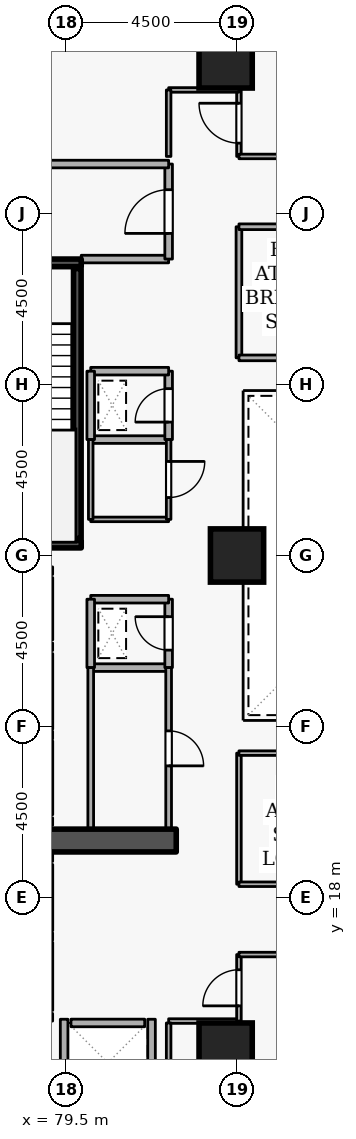
"""IFC4 building model, lengths in metres.
Left out: names, types, materials, properties, quantities, classifications, styles, units other than length and angle.
Written with IfcOpenShell. Run it as: python <this file> out.ifc"""

import sys

from ifc_helpers import new_model, si_unit, direction, frame, frame_2d, origin, origin_2d, place, context, subcontext, project, spatial, rectangle, extrude, element, fill, save


model = new_model("IFC4")
c1 = context("Model", 3, precision=1e-05, world=origin(), true_north=direction((0.0, 1.0)))
c2 = subcontext(c1, "Body", "Model", "MODEL_VIEW")
j1 = project(units=[si_unit("LENGTHUNIT", "METRE"), si_unit("PLANEANGLEUNIT", "RADIAN")], contexts=[c1])
p1 = place(None, origin())
s1 = spatial("IfcSite", under=j1, at=p1, CompositionType="ELEMENT")
p2 = place(p1, origin())
s2 = spatial("IfcBuilding", under=s1, at=p2, CompositionType="ELEMENT")
p3 = place(p2, frame((0.0, 0.0, 60.9)))
s3 = spatial("IfcBuildingStorey", under=s2, at=p3, CompositionType="ELEMENT", Elevation=60.9)
p4 = place(p3, frame((76.7, 19.5, 0.0), z_axis=(0.0, 0.0, 1.0), x_axis=(1.0, 0.0, 0.0)))
e1 = element("IfcWall", 1, at=p4, inside=s3, PredefinedType="SHEAR", context=c2, shape_type="SweptSolid", body=[
    extrude(rectangle(XDim=5.7, YDim=0.6, at=frame_2d((2.85, 0.0))), origin(), (0.0, 0.0, 1.0), 3.6),
])
for number, where, z_axis, x_axis in (
    (2, (83.7, 14.0, 0.0), (0.0, 0.0, 1.0), (1.0, 0.0, 0.0)),
    (3, (83.7, 40.0, 0.0), (0.0, 0.0, 1.0), (1.0, 0.0, 0.0)),
    (4, (84.0, 27.0, 0.0), (0.0, 0.0, 1.0), (1.0, 0.0, 0.0)),
):
    element("IfcColumn", number, at=place(p3, frame(where, z_axis=z_axis, x_axis=x_axis)), inside=s3, PredefinedType="COLUMN", context=c2, shape_type="SweptSolid", body=[
        extrude(rectangle(XDim=1.4, YDim=1.4, at=origin_2d()), origin(), (0.0, 0.0, 1.0), 3.6),
    ])
p5 = place(p3, frame((79.05, 24.78, 0.0), z_axis=(0.0, 0.0, 1.0), x_axis=(0.0, 1.0, 0.0)))
e5 = element("IfcWall", 5, at=p5, inside=s3, PredefinedType="STANDARD", context=c2, shape_type="SweptSolid", body=[
    extrude(rectangle(XDim=1.64, YDim=0.2, at=frame_2d((0.82, 0.0))), origin(), (0.0, 0.0, 1.0), 3.34),
])
p6 = place(p5, frame((0.31, 0.0, 0.0)))
e6 = element("IfcOpeningElement", 6, at=p6, cuts=e5, PredefinedType="OPENING", context=c2, shape_type="SweptSolid", body=[
    extrude(rectangle(XDim=1.02, YDim=2.06, at=frame_2d((0.51, 1.03))), frame((0.0, 0.11, 0.0), z_axis=(0.0, -1.0, 0.0), x_axis=(1.0, 0.0, 0.0)), (0.0, 0.0, 1.0), 0.22),
])
p7 = place(p3, frame((79.05, 22.43, 0.0), z_axis=(0.0, 0.0, 1.0), x_axis=(0.0, 1.0, 0.0)))
e7 = element("IfcWall", 7, at=p7, inside=s3, PredefinedType="STANDARD", context=c2, shape_type="SweptSolid", body=[
    extrude(rectangle(XDim=1.99, YDim=0.2, at=frame_2d((0.995, 0.0))), origin(), (0.0, 0.0, 1.0), 3.34),
])
p8 = place(p3, frame((79.05, 20.18, 0.0), z_axis=(0.0, 0.0, 1.0), x_axis=(0.0, 1.0, 0.0)))
e8 = element("IfcWall", 8, at=p8, inside=s3, PredefinedType="STANDARD", context=c2, shape_type="SweptSolid", body=[
    extrude(rectangle(XDim=1.94, YDim=0.2, at=frame_2d((0.97, 0.0))), origin(), (0.0, 0.0, 1.0), 3.34),
])
p9 = place(p3, frame((79.05, 17.13, 0.0), z_axis=(0.0, 0.0, 1.0), x_axis=(0.0, 1.0, 0.0)))
e9 = element("IfcWall", 9, at=p9, inside=s3, PredefinedType="STANDARD", context=c2, shape_type="SweptSolid", body=[
    extrude(rectangle(XDim=1.74, YDim=0.2, at=frame_2d((0.87, 0.0))), origin(), (0.0, 0.0, 1.0), 3.34),
])
p10 = place(p3, frame((79.05, 15.03, 0.0), z_axis=(0.0, 0.0, 1.0), x_axis=(0.0, 1.0, 0.0)))
e10 = element("IfcWall", 10, at=p10, inside=s3, PredefinedType="STANDARD", context=c2, shape_type="SweptSolid", body=[
    extrude(rectangle(XDim=1.79, YDim=0.2, at=frame_2d((0.895, 0.0))), origin(), (0.0, 0.0, 1.0), 3.34),
])
p11 = place(p3, frame((79.63, 14.7, 0.0), z_axis=(0.0, 0.0, 1.0), x_axis=(1.0, 0.0, 0.0)))
e11 = element("IfcWall", 11, at=p11, inside=s3, PredefinedType="STANDARD", context=c2, shape_type="SweptSolid", body=[
    extrude(rectangle(XDim=1.94, YDim=0.2, at=frame_2d((0.97, 0.0))), origin(), (0.0, 0.0, 1.0), 3.34),
])
for number, where, z_axis, x_axis in (
    (12, (81.75, 12.612, 0.0), (0.0, 0.0, 1.0), (0.0, 1.0, 0.0)),
    (13, (79.45, 12.612, 0.0), (0.0, 0.0, 1.0), (0.0, 1.0, 0.0)),
):
    element("IfcWall", number, at=place(p3, frame(where, z_axis=z_axis, x_axis=x_axis)), inside=s3, PredefinedType="STANDARD", context=c2, shape_type="SweptSolid", body=[
        extrude(rectangle(XDim=2.186, YDim=0.2, at=frame_2d((1.093, 0.0))), origin(), (0.0, 0.0, 1.0), 3.34),
    ])
p12 = place(p3, frame((76.55, 34.7, 0.0), z_axis=(0.0, 0.0, 1.0), x_axis=(1.0, 0.0, 0.0)))
e14 = element("IfcWall", 14, at=p12, inside=s3, PredefinedType="SHEAR", context=c2, shape_type="SweptSolid", body=[
    extrude(rectangle(XDim=3.35, YDim=0.2, at=frame_2d((1.675, 0.0))), origin(), (0.0, 0.0, 1.0), 3.6),
])
p13 = place(p12, frame((1.125, 0.0, 0.0)))
e15 = element("IfcOpeningElement", 15, at=p13, cuts=e14, PredefinedType="OPENING", context=c2, shape_type="SweptSolid", body=[
    extrude(rectangle(XDim=1.1, YDim=2.1, at=frame_2d((0.55, 1.05))), frame((0.0, 0.11, 0.0), z_axis=(0.0, -1.0, 0.0), x_axis=(1.0, 0.0, 0.0)), (0.0, 0.0, 1.0), 0.22),
])
p14 = place(p3, frame((79.9, 27.3, 0.0), z_axis=(0.0, 0.0, 1.0), x_axis=(-1.0, 0.0, 0.0)))
e16 = element("IfcWall", 16, at=p14, inside=s3, PredefinedType="SHEAR", context=c2, shape_type="SweptSolid", body=[
    extrude(rectangle(XDim=3.35, YDim=0.2, at=frame_2d((1.675, 0.0))), origin(), (0.0, 0.0, 1.0), 3.6),
])
p15 = place(p3, frame((79.797, 27.45, 0.0), z_axis=(0.0, 0.0, 1.0), x_axis=(0.0, 1.0, 0.0)))
e17 = element("IfcWall", 17, at=p15, inside=s3, PredefinedType="SHEAR", context=c2, shape_type="SweptSolid", body=[
    extrude(rectangle(XDim=7.1, YDim=0.2, at=frame_2d((3.55, 0.0))), origin(), (0.0, 0.0, 1.0), 3.6),
])
p16 = place(p3, frame((79.9, 34.8, 0.0), z_axis=(0.0, 0.0, 1.0), x_axis=(1.0, 0.0, 0.0)))
e18 = element("IfcWall", 18, at=p16, inside=s3, PredefinedType="STANDARD", context=c2, shape_type="SweptSolid", body=[
    extrude(rectangle(XDim=2.3, YDim=0.2, at=frame_2d((1.15, 0.0))), origin(), (0.0, 0.0, 1.0), 2.545),
])
p17 = place(p3, frame((82.2, 34.8, 0.0), z_axis=(0.0, 0.0, 1.0), x_axis=(0.0, 1.0, 0.0)))
e19 = element("IfcWall", 19, at=p17, inside=s3, PredefinedType="STANDARD", context=c2, shape_type="SweptSolid", body=[
    extrude(rectangle(XDim=2.5, YDim=0.2, at=frame_2d((1.25, 0.0))), origin(), (0.0, 0.0, 1.0), 3.34),
])
p18 = place(p17, frame((0.675, 0.0, 0.0)))
e20 = element("IfcOpeningElement", 20, at=p18, cuts=e19, PredefinedType="OPENING", context=c2, shape_type="SweptSolid", body=[
    extrude(rectangle(XDim=1.15, YDim=2.1, at=frame_2d((0.575, 1.05))), frame((0.0, 0.11, 0.0), z_axis=(0.0, -1.0, 0.0), x_axis=(1.0, 0.0, 0.0)), (0.0, 0.0, 1.0), 0.22),
])
p19 = place(p3, frame((82.2, 37.3, 0.0), z_axis=(0.0, 0.0, 1.0), x_axis=(-1.0, 0.0, 0.0)))
e21 = element("IfcWall", 21, at=p19, inside=s3, PredefinedType="STANDARD", context=c2, shape_type="SweptSolid", body=[
    extrude(rectangle(XDim=5.7, YDim=0.2, at=frame_2d((2.85, 0.0))), origin(), (0.0, 0.0, 1.0), 3.34),
])
p20 = place(p3, frame((80.15, 24.05, 0.0), z_axis=(0.0, 0.0, 1.0), x_axis=(1.0, 0.0, 0.0)))
e22 = element("IfcWall", 22, at=p20, inside=s3, PredefinedType="STANDARD", context=c2, shape_type="SweptSolid", body=[
    extrude(rectangle(XDim=2.05, YDim=0.2, at=frame_2d((1.025, 0.0))), origin(), (0.0, 0.0, 1.0), 3.34),
])
p21 = place(p3, frame((82.2, 24.05, 0.0), z_axis=(0.0, 0.0, 1.0), x_axis=(0.0, 1.0, 0.0)))
e23 = element("IfcWall", 23, at=p21, inside=s3, PredefinedType="STANDARD", context=c2, shape_type="SweptSolid", body=[
    extrude(rectangle(XDim=1.8, YDim=0.2, at=frame_2d((0.9, 0.0))), origin(), (0.0, 0.0, 1.0), 3.34),
])
p22 = place(p21, frame((0.46, 0.0, 0.0)))
e24 = element("IfcOpeningElement", 24, at=p22, cuts=e23, PredefinedType="OPENING", context=c2, shape_type="SweptSolid", body=[
    extrude(rectangle(XDim=0.88, YDim=2.04, at=frame_2d((0.44, 1.02))), frame((0.0, 0.11, 0.0), z_axis=(0.0, -1.0, 0.0), x_axis=(1.0, 0.0, 0.0)), (0.0, 0.0, 1.0), 0.22),
])
p23 = place(p3, frame((82.2, 25.85, 0.0), z_axis=(0.0, 0.0, 1.0), x_axis=(-1.0, 0.0, 0.0)))
e25 = element("IfcWall", 25, at=p23, inside=s3, PredefinedType="STANDARD", context=c2, shape_type="SweptSolid", body=[
    extrude(rectangle(XDim=2.05, YDim=0.2, at=frame_2d((1.025, 0.0))), origin(), (0.0, 0.0, 1.0), 3.34),
])
p24 = place(p3, frame((80.15, 25.85, 0.0), z_axis=(0.0, 0.0, 1.0), x_axis=(0.0, -1.0, 0.0)))
e26 = element("IfcWall", 26, at=p24, inside=s3, PredefinedType="STANDARD", context=c2, shape_type="SweptSolid", body=[
    extrude(rectangle(XDim=1.8, YDim=0.2, at=frame_2d((0.9, 0.0))), origin(), (0.0, 0.0, 1.0), 3.34),
])
p25 = place(p3, frame((80.15, 30.05, 0.0), z_axis=(0.0, 0.0, 1.0), x_axis=(1.0, 0.0, 0.0)))
e27 = element("IfcWall", 27, at=p25, inside=s3, PredefinedType="STANDARD", context=c2, shape_type="SweptSolid", body=[
    extrude(rectangle(XDim=2.05, YDim=0.2, at=frame_2d((1.025, 0.0))), origin(), (0.0, 0.0, 1.0), 3.34),
])
p26 = place(p3, frame((82.2, 30.05, 0.0), z_axis=(0.0, 0.0, 1.0), x_axis=(0.0, 1.0, 0.0)))
e28 = element("IfcWall", 28, at=p26, inside=s3, PredefinedType="STANDARD", context=c2, shape_type="SweptSolid", body=[
    extrude(rectangle(XDim=1.8, YDim=0.2, at=frame_2d((0.9, 0.0))), origin(), (0.0, 0.0, 1.0), 3.34),
])
p27 = place(p26, frame((0.46, 0.0, 0.0)))
e29 = element("IfcOpeningElement", 29, at=p27, cuts=e28, PredefinedType="OPENING", context=c2, shape_type="SweptSolid", body=[
    extrude(rectangle(XDim=0.88, YDim=2.04, at=frame_2d((0.44, 1.02))), frame((0.0, 0.11, 0.0), z_axis=(0.0, -1.0, 0.0), x_axis=(1.0, 0.0, 0.0)), (0.0, 0.0, 1.0), 0.22),
])
p28 = place(p3, frame((82.2, 31.85, 0.0), z_axis=(0.0, 0.0, 1.0), x_axis=(-1.0, 0.0, 0.0)))
e30 = element("IfcWall", 30, at=p28, inside=s3, PredefinedType="STANDARD", context=c2, shape_type="SweptSolid", body=[
    extrude(rectangle(XDim=2.05, YDim=0.2, at=frame_2d((1.025, 0.0))), origin(), (0.0, 0.0, 1.0), 3.34),
])
p29 = place(p3, frame((80.15, 31.85, 0.0), z_axis=(0.0, 0.0, 1.0), x_axis=(0.0, -1.0, 0.0)))
e31 = element("IfcWall", 31, at=p29, inside=s3, PredefinedType="STANDARD", context=c2, shape_type="SweptSolid", body=[
    extrude(rectangle(XDim=1.8, YDim=0.2, at=frame_2d((0.9, 0.0))), origin(), (0.0, 0.0, 1.0), 3.34),
])
p30 = place(p3, frame((80.15, 19.8, 0.0), z_axis=(0.0, 0.0, 1.0), x_axis=(0.0, 1.0, 0.0)))
e32 = element("IfcWall", 32, at=p30, inside=s3, PredefinedType="PARTITIONING", context=c2, shape_type="SweptSolid", body=[
    extrude(rectangle(XDim=4.25, YDim=0.15, at=frame_2d((2.125, 0.0))), origin(), (0.0, 0.0, 1.0), 3.34),
])
p31 = place(p3, frame((82.2, 24.05, 0.0), z_axis=(0.0, 0.0, 1.0), x_axis=(0.0, -1.0, 0.0)))
e33 = element("IfcWall", 33, at=p31, inside=s3, PredefinedType="PARTITIONING", context=c2, shape_type="SweptSolid", body=[
    extrude(rectangle(XDim=4.25, YDim=0.15, at=frame_2d((2.125, 0.0))), origin(), (0.0, 0.0, 1.0), 3.34),
])
p32 = place(p31, frame((1.665, 0.0, 0.0)))
e34 = element("IfcOpeningElement", 34, at=p32, cuts=e33, PredefinedType="OPENING", context=c2, shape_type="SweptSolid", body=[
    extrude(rectangle(XDim=0.92, YDim=2.08, at=frame_2d((0.46, 1.04))), frame((0.0, 0.085, 0.0), z_axis=(0.0, -1.0, 0.0), x_axis=(1.0, 0.0, 0.0)), (0.0, 0.0, 1.0), 0.17),
])
p33 = place(p3, frame((82.2, 27.95, 0.0), z_axis=(0.0, 0.0, 1.0), x_axis=(-1.0, 0.0, 0.0)))
e35 = element("IfcWall", 35, at=p33, inside=s3, PredefinedType="PARTITIONING", context=c2, shape_type="SweptSolid", body=[
    extrude(rectangle(XDim=2.05, YDim=0.12, at=frame_2d((1.025, 0.0))), origin(), (0.0, 0.0, 1.0), 3.34),
])
p34 = place(p3, frame((80.15, 27.95, 0.0), z_axis=(0.0, 0.0, 1.0), x_axis=(0.0, 1.0, 0.0)))
e36 = element("IfcWall", 36, at=p34, inside=s3, PredefinedType="PARTITIONING", context=c2, shape_type="SweptSolid", body=[
    extrude(rectangle(XDim=2.1, YDim=0.12, at=frame_2d((1.05, 0.0))), origin(), (0.0, 0.0, 1.0), 3.34),
])
p35 = place(p3, frame((82.2, 30.05, 0.0), z_axis=(0.0, 0.0, 1.0), x_axis=(0.0, -1.0, 0.0)))
e37 = element("IfcWall", 37, at=p35, inside=s3, PredefinedType="PARTITIONING", context=c2, shape_type="SweptSolid", body=[
    extrude(rectangle(XDim=2.1, YDim=0.12, at=frame_2d((1.05, 0.0))), origin(), (0.0, 0.0, 1.0), 3.34),
])
p36 = place(p35, frame((0.575, 0.0, 0.0)))
e38 = element("IfcOpeningElement", 38, at=p36, cuts=e37, PredefinedType="OPENING", context=c2, shape_type="SweptSolid", body=[
    extrude(rectangle(XDim=0.95, YDim=2.1, at=frame_2d((0.475, 1.05))), frame((0.0, 0.07, 0.0), z_axis=(0.0, -1.0, 0.0), x_axis=(1.0, 0.0, 0.0)), (0.0, 0.0, 1.0), 0.14),
])
p37 = place(p3, frame((82.2, 14.75, 0.0), z_axis=(0.0, 0.0, 1.0), x_axis=(1.0, 0.0, 0.0)))
e39 = element("IfcWall", 39, at=p37, inside=s3, PredefinedType="PARTITIONING", context=c2, shape_type="SweptSolid", body=[
    extrude(rectangle(XDim=1.85, YDim=0.12, at=frame_2d((0.925, 0.0))), origin(), (0.0, 0.0, 1.0), 3.34),
])
p38 = place(p3, frame((84.05, 14.75, 0.0), z_axis=(0.0, 0.0, 1.0), x_axis=(0.0, 1.0, 0.0)))
e40 = element("IfcWall", 40, at=p38, inside=s3, PredefinedType="PARTITIONING", context=c2, shape_type="SweptSolid", body=[
    extrude(rectangle(XDim=1.75, YDim=0.12, at=frame_2d((0.875, 0.0))), origin(), (0.0, 0.0, 1.0), 3.34),
])
p39 = place(p38, frame((0.4, 0.0, 0.0)))
e41 = element("IfcOpeningElement", 41, at=p39, cuts=e40, PredefinedType="OPENING", context=c2, shape_type="SweptSolid", body=[
    extrude(rectangle(XDim=0.95, YDim=2.1, at=frame_2d((0.475, 1.05))), frame((0.0, 0.07, 0.0), z_axis=(0.0, -1.0, 0.0), x_axis=(1.0, 0.0, 0.0)), (0.0, 0.0, 1.0), 0.14),
])
p40 = place(p3, frame((84.05, 16.5, 0.0), z_axis=(0.0, 0.0, 1.0), x_axis=(1.0, 0.0, 0.0)))
e42 = element("IfcWall", 42, at=p40, inside=s3, PredefinedType="PARTITIONING", context=c2, shape_type="SweptSolid", body=[
    extrude(rectangle(XDim=1.3, YDim=0.12, at=frame_2d((0.65, 0.0))), origin(), (0.0, 0.0, 1.0), 3.34),
])
p41 = place(p3, frame((82.2, 12.4, 0.0), z_axis=(0.0, 0.0, 1.0), x_axis=(0.0, 1.0, 0.0)))
e43 = element("IfcWall", 43, at=p41, inside=s3, PredefinedType="PARTITIONING", context=c2, shape_type="SweptSolid", body=[
    extrude(rectangle(XDim=2.3, YDim=0.12, at=frame_2d((1.15, 0.0))), origin(), (0.0, 0.0, 1.0), 3.34),
])
p42 = place(p3, frame((84.05, 37.5, 0.0), z_axis=(0.0, 0.0, 1.0), x_axis=(0.0, 1.0, 0.0)))
e44 = element("IfcWall", 44, at=p42, inside=s3, PredefinedType="PARTITIONING", context=c2, shape_type="SweptSolid", body=[
    extrude(rectangle(XDim=1.75, YDim=0.12, at=frame_2d((0.875, 0.0))), origin(), (0.0, 0.0, 1.0), 3.34),
])
p43 = place(p42, frame((0.35, 0.0, 0.0)))
e45 = element("IfcOpeningElement", 45, at=p43, cuts=e44, PredefinedType="OPENING", context=c2, shape_type="SweptSolid", body=[
    extrude(rectangle(XDim=1.05, YDim=2.1, at=frame_2d((0.525, 1.05))), frame((0.0, 0.07, 0.0), z_axis=(0.0, -1.0, 0.0), x_axis=(1.0, 0.0, 0.0)), (0.0, 0.0, 1.0), 0.14),
])
p44 = place(p3, frame((84.05, 39.25, 0.0), z_axis=(0.0, 0.0, 1.0), x_axis=(-1.0, 0.0, 0.0)))
e46 = element("IfcWall", 46, at=p44, inside=s3, PredefinedType="PARTITIONING", context=c2, shape_type="SweptSolid", body=[
    extrude(rectangle(XDim=1.85, YDim=0.12, at=frame_2d((0.925, 0.0))), origin(), (0.0, 0.0, 1.0), 3.34),
])
p45 = place(p3, frame((82.2, 39.25, 0.0), z_axis=(0.0, 0.0, 1.0), x_axis=(0.0, -1.0, 0.0)))
e47 = element("IfcWall", 47, at=p45, inside=s3, PredefinedType="PARTITIONING", context=c2, shape_type="SweptSolid", body=[
    extrude(rectangle(XDim=1.75, YDim=0.12, at=frame_2d((0.875, 0.0))), origin(), (0.0, 0.0, 1.0), 3.34),
])
p46 = place(p3, frame((85.35, 37.5, 0.0), z_axis=(0.0, 0.0, 1.0), x_axis=(-1.0, 0.0, 0.0)))
e48 = element("IfcWall", 48, at=p46, inside=s3, PredefinedType="PARTITIONING", context=c2, shape_type="SweptSolid", body=[
    extrude(rectangle(XDim=1.3, YDim=0.12, at=frame_2d((0.65, 0.0))), origin(), (0.0, 0.0, 1.0), 3.34),
])
p47 = place(p3, frame((84.05, 32.2, 0.0), z_axis=(0.0, 0.0, 1.0), x_axis=(0.0, 1.0, 0.0)))
e49 = element("IfcWall", 49, at=p47, inside=s3, PredefinedType="PARTITIONING", context=c2, shape_type="SweptSolid", body=[
    extrude(rectangle(XDim=3.45, YDim=0.15, at=frame_2d((1.725, 0.0))), origin(), (0.0, 0.0, 1.0), 3.34),
])
p48 = place(p3, frame((84.05, 35.65, 0.0), z_axis=(0.0, 0.0, 1.0), x_axis=(1.0, 0.0, 0.0)))
e50 = element("IfcWall", 50, at=p48, inside=s3, PredefinedType="PARTITIONING", context=c2, shape_type="SweptSolid", body=[
    extrude(rectangle(XDim=8.9, YDim=0.15, at=frame_2d((4.45, 0.0))), origin(), (0.0, 0.0, 1.0), 3.34),
])
p49 = place(p48, frame((3.8, 0.0, 0.0)))
e51 = element("IfcOpeningElement", 51, at=p49, cuts=e50, PredefinedType="OPENING", context=c2, shape_type="SweptSolid", body=[
    extrude(rectangle(XDim=1.3, YDim=2.12, at=frame_2d((0.65, 1.06))), frame((0.0, 0.085, 0.0), z_axis=(0.0, -1.0, 0.0), x_axis=(1.0, 0.0, 0.0)), (0.0, 0.0, 1.0), 0.17),
])
p50 = place(p3, frame((92.95, 32.2, 0.0), z_axis=(0.0, 0.0, 1.0), x_axis=(-1.0, 0.0, 0.0)))
e52 = element("IfcWall", 52, at=p50, inside=s3, PredefinedType="PARTITIONING", context=c2, shape_type="SweptSolid", body=[
    extrude(rectangle(XDim=8.9, YDim=0.15, at=frame_2d((4.45, 0.0))), origin(), (0.0, 0.0, 1.0), 3.34),
])
p51 = place(p3, frame((84.05, 18.35, 0.0), z_axis=(0.0, 0.0, 1.0), x_axis=(0.0, 1.0, 0.0)))
e53 = element("IfcWall", 53, at=p51, inside=s3, PredefinedType="PARTITIONING", context=c2, shape_type="SweptSolid", body=[
    extrude(rectangle(XDim=3.45, YDim=0.12, at=frame_2d((1.725, 0.0))), origin(), (0.0, 0.0, 1.0), 3.34),
])
p52 = place(p3, frame((84.05, 21.8, 0.0), z_axis=(0.0, 0.0, 1.0), x_axis=(1.0, 0.0, 0.0)))
e54 = element("IfcWall", 54, at=p52, inside=s3, PredefinedType="PARTITIONING", context=c2, shape_type="SweptSolid", body=[
    extrude(rectangle(XDim=8.9, YDim=0.12, at=frame_2d((4.45, 0.0))), origin(), (0.0, 0.0, 1.0), 3.34),
])
p53 = place(p3, frame((92.95, 18.35, 0.0), z_axis=(0.0, 0.0, 1.0), x_axis=(-1.0, 0.0, 0.0)))
e55 = element("IfcWall", 55, at=p53, inside=s3, PredefinedType="PARTITIONING", context=c2, shape_type="SweptSolid", body=[
    extrude(rectangle(XDim=8.9, YDim=0.12, at=frame_2d((4.45, 0.0))), origin(), (0.0, 0.0, 1.0), 3.34),
])
p54 = place(p53, frame((3.975, 0.0, 0.0)))
e56 = element("IfcOpeningElement", 56, at=p54, cuts=e55, PredefinedType="OPENING", context=c2, shape_type="SweptSolid", body=[
    extrude(rectangle(XDim=0.95, YDim=2.1, at=frame_2d((0.475, 1.05))), frame((0.0, 0.07, 0.0), z_axis=(0.0, -1.0, 0.0), x_axis=(1.0, 0.0, 0.0)), (0.0, 0.0, 1.0), 0.14),
])
p55 = place(p18, origin())
e57 = element("IfcDoor", 57, at=p55, inside=s3, OperationType="SINGLE_SWING_LEFT", PredefinedType="DOOR", context=c2, shape_type="SweptSolid", body=[
    extrude(rectangle(XDim=1.15, YDim=2.1, at=frame_2d((0.575, 1.05))), frame((0.0, 0.025, 0.0), z_axis=(0.0, -1.0, 0.0), x_axis=(1.0, 0.0, 0.0)), (0.0, 0.0, 1.0), 0.05),
])
fill(e20, e57)
p56 = place(p22, origin())
e58 = element("IfcDoor", 58, at=p56, inside=s3, OperationType="SINGLE_SWING_RIGHT", PredefinedType="DOOR", context=c2, shape_type="SweptSolid", body=[
    extrude(rectangle(XDim=0.88, YDim=2.04, at=frame_2d((0.44, 1.02))), frame((0.0, 0.025, 0.0), z_axis=(0.0, -1.0, 0.0), x_axis=(1.0, 0.0, 0.0)), (0.0, 0.0, 1.0), 0.05),
])
fill(e24, e58)
p57 = place(p27, origin())
e59 = element("IfcDoor", 59, at=p57, inside=s3, OperationType="SINGLE_SWING_LEFT", PredefinedType="DOOR", context=c2, shape_type="SweptSolid", body=[
    extrude(rectangle(XDim=0.88, YDim=2.04, at=frame_2d((0.44, 1.02))), frame((0.0, 0.025, 0.0), z_axis=(0.0, -1.0, 0.0), x_axis=(1.0, 0.0, 0.0)), (0.0, 0.0, 1.0), 0.05),
])
fill(e29, e59)
p58 = place(p32, origin())
e60 = element("IfcDoor", 60, at=p58, inside=s3, OperationType="SINGLE_SWING_RIGHT", PredefinedType="DOOR", context=c2, shape_type="SweptSolid", body=[
    extrude(rectangle(XDim=0.92, YDim=2.08, at=frame_2d((0.46, 1.04))), frame((0.0, 0.025, 0.0), z_axis=(0.0, -1.0, 0.0), x_axis=(1.0, 0.0, 0.0)), (0.0, 0.0, 1.0), 0.05),
])
fill(e34, e60)
p59 = place(p36, origin())
e61 = element("IfcDoor", 61, at=p59, inside=s3, OperationType="SINGLE_SWING_LEFT", PredefinedType="DOOR", context=c2, shape_type="SweptSolid", body=[
    extrude(rectangle(XDim=0.95, YDim=2.1, at=frame_2d((0.475, 1.05))), frame((0.0, 0.025, 0.0), z_axis=(0.0, -1.0, 0.0), x_axis=(1.0, 0.0, 0.0)), (0.0, 0.0, 1.0), 0.05),
])
fill(e38, e61)
p60 = place(p39, origin())
e62 = element("IfcDoor", 62, at=p60, inside=s3, OperationType="SINGLE_SWING_LEFT", PredefinedType="DOOR", context=c2, shape_type="SweptSolid", body=[
    extrude(rectangle(XDim=0.95, YDim=2.1, at=frame_2d((0.475, 1.05))), frame((0.0, 0.025, 0.0), z_axis=(0.0, -1.0, 0.0), x_axis=(1.0, 0.0, 0.0)), (0.0, 0.0, 1.0), 0.05),
])
fill(e41, e62)
p61 = place(p43, origin())
e63 = element("IfcDoor", 63, at=p61, inside=s3, OperationType="SINGLE_SWING_RIGHT", PredefinedType="DOOR", context=c2, shape_type="SweptSolid", body=[
    extrude(rectangle(XDim=1.05, YDim=2.1, at=frame_2d((0.525, 1.05))), frame((0.0, 0.025, 0.0), z_axis=(0.0, -1.0, 0.0), x_axis=(1.0, 0.0, 0.0)), (0.0, 0.0, 1.0), 0.05),
])
fill(e45, e63)
save(model, sys.argv[1])
